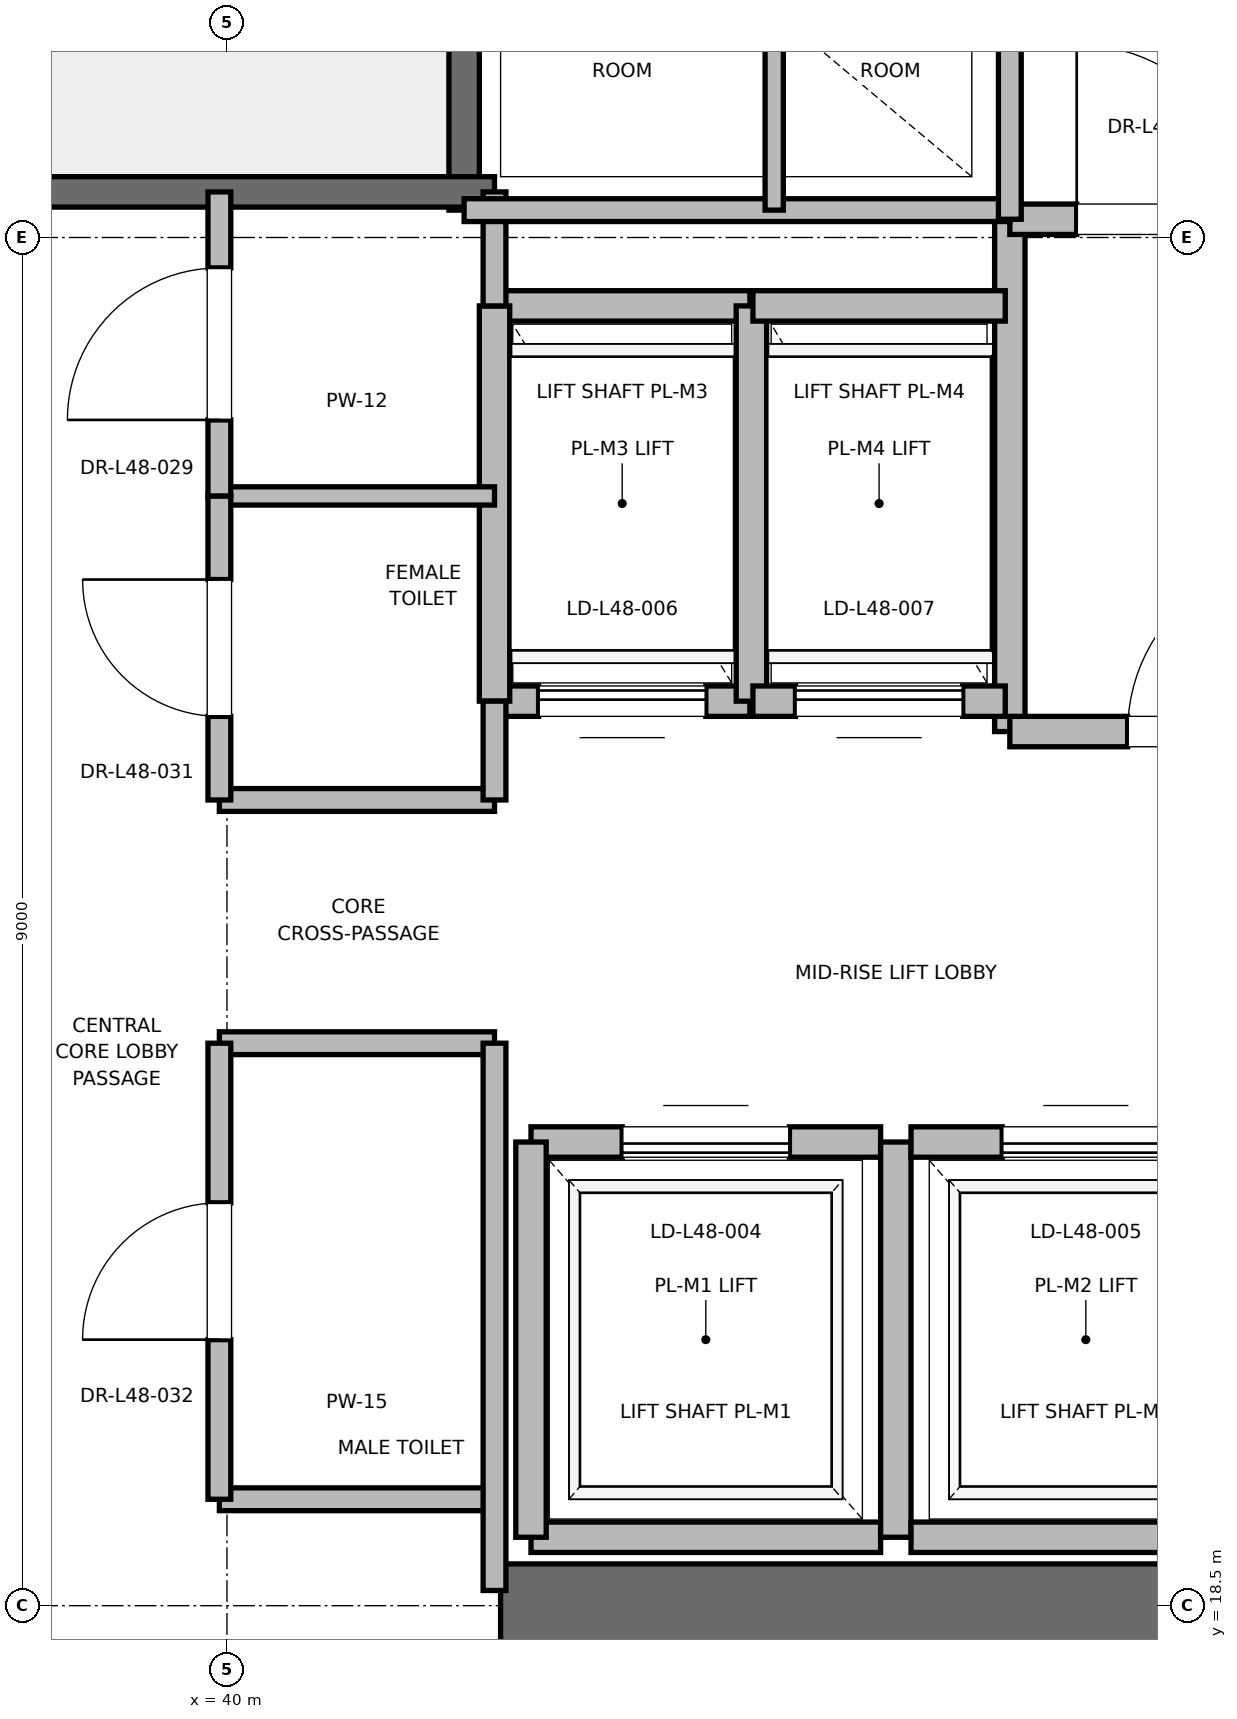
"""IFC4 building model, lengths in metres.
Left out: names, types, materials, properties, quantities, classifications, styles, units other than length and angle.
Written with IfcOpenShell. Run it as: python <this file> out.ifc"""

import sys

from ifc_helpers import new_model, si_unit, direction, frame, frame_2d, origin, place, context, subcontext, project, spatial, rectangle, extrude, element, fill, save


model = new_model("IFC4")
c1 = context("Model", 3, precision=1e-05, world=origin(), true_north=direction((0.0, 1.0)))
c2 = subcontext(c1, "Body", "Model", "MODEL_VIEW")
j1 = project(units=[si_unit("LENGTHUNIT", "METRE"), si_unit("PLANEANGLEUNIT", "RADIAN")], contexts=[c1])
p1 = place(None, origin())
s1 = spatial("IfcSite", under=j1, at=p1, CompositionType="ELEMENT")
p2 = place(p1, origin())
s2 = spatial("IfcBuilding", under=s1, at=p2, CompositionType="ELEMENT")
p3 = place(p2, frame((0.0, 0.0, 209.2)))
s3 = spatial("IfcBuildingStorey", under=s2, at=p3, CompositionType="ELEMENT", Elevation=209.2)
p4 = place(p3, frame((41.8, 18.5, 0.0), z_axis=(0.0, 0.0, 1.0), x_axis=(1.0, 0.0, 0.0)))
e1 = element("IfcWall", 1, at=p4, inside=s3, PredefinedType="SHEAR", context=c2, shape_type="SweptSolid", body=[
    extrude(rectangle(XDim=9.2, YDim=0.55, at=frame_2d((4.6, 0.0))), origin(), (0.0, 0.0, 1.0), 3.775),
])
p5 = place(p3, frame((41.56, 27.68, 0.0), z_axis=(0.0, 0.0, 1.0), x_axis=(0.0, 1.0, 0.0)))
e2 = element("IfcWall", 2, at=p5, inside=s3, PredefinedType="SOLIDWALL", context=c2, shape_type="SweptSolid", body=[
    extrude(rectangle(XDim=8.57, YDim=0.2, at=frame_2d((4.285, 0.0))), origin(), (0.0, 0.0, 1.0), 3.775),
])
p6 = place(p3, frame((38.44, 27.8, 0.0), z_axis=(0.0, 0.0, 1.0), x_axis=(1.0, 0.0, 0.0)))
e3 = element("IfcWall", 3, at=p6, inside=s3, PredefinedType="SOLIDWALL", context=c2, shape_type="SweptSolid", body=[
    extrude(rectangle(XDim=3.32, YDim=0.2, at=frame_2d((1.66, 0.0))), origin(), (0.0, 0.0, 1.0), 3.775),
])
p7 = place(p3, frame((45.15, 24.25, 0.0), z_axis=(0.0, 0.0, 1.0), x_axis=(0.0, 1.0, 0.0)))
e4 = element("IfcWall", 4, at=p7, inside=s3, PredefinedType="PARTITIONING", context=c2, shape_type="SweptSolid", body=[
    extrude(rectangle(XDim=3.37, YDim=0.2, at=frame_2d((1.685, 0.0))), origin(), (0.0, 0.0, 1.0), 3.775),
])
p8 = place(p3, frame((45.15, 24.25, 0.0), z_axis=(0.0, 0.0, 1.0), x_axis=(1.0, 0.0, 0.0)))
e5 = element("IfcWall", 5, at=p8, inside=s3, PredefinedType="PARTITIONING", context=c2, shape_type="SweptSolid", body=[
    extrude(rectangle(XDim=2.7, YDim=0.2, at=frame_2d((1.35, 0.0))), origin(), (0.0, 0.0, 1.0), 3.775),
])
p9 = place(p8, frame((0.775, 0.0, 0.0)))
e6 = element("IfcOpeningElement", 6, at=p9, cuts=e5, PredefinedType="OPENING", context=c2, shape_type="SweptSolid", body=[
    extrude(rectangle(XDim=1.15, YDim=2.2, at=frame_2d((0.575, 1.1))), frame((0.0, 0.1, 0.0), z_axis=(0.0, -1.0, 0.0), x_axis=(1.0, 0.0, 0.0)), (0.0, 0.0, 1.0), 0.2),
])
p10 = place(p3, frame((45.15, 27.62, 0.0), z_axis=(0.0, 0.0, 1.0), x_axis=(1.0, 0.0, 0.0)))
e7 = element("IfcWall", 7, at=p10, inside=s3, PredefinedType="PARTITIONING", context=c2, shape_type="SweptSolid", body=[
    extrude(rectangle(XDim=2.03, YDim=0.2, at=frame_2d((1.015, 0.0))), origin(), (0.0, 0.0, 1.0), 3.775),
])
p11 = place(p10, frame((0.44, 0.0, 0.0)))
e8 = element("IfcOpeningElement", 8, at=p11, cuts=e7, PredefinedType="OPENING", context=c2, shape_type="SweptSolid", body=[
    extrude(rectangle(XDim=1.15, YDim=2.2, at=frame_2d((0.575, 1.1))), frame((0.0, 0.1, 0.0), z_axis=(0.0, -1.0, 0.0), x_axis=(1.0, 0.0, 0.0)), (0.0, 0.0, 1.0), 0.2),
])
p12 = place(p3, frame((42.0, 18.95, 0.0), z_axis=(0.0, 0.0, 1.0), x_axis=(1.0, 0.0, 0.0)))
e9 = element("IfcWall", 9, at=p12, inside=s3, PredefinedType="SOLIDWALL", context=c2, shape_type="SweptSolid", body=[
    extrude(rectangle(XDim=2.3, YDim=0.2, at=frame_2d((1.15, 0.0))), origin(), (0.0, 0.0, 1.0), 2.755),
])
p13 = place(p3, frame((44.3, 21.55, 0.0), z_axis=(0.0, 0.0, 1.0), x_axis=(-1.0, 0.0, 0.0)))
e10 = element("IfcWall", 10, at=p13, inside=s3, PredefinedType="SOLIDWALL", context=c2, shape_type="SweptSolid", body=[
    extrude(rectangle(XDim=2.3, YDim=0.2, at=frame_2d((1.15, 0.0))), origin(), (0.0, 0.0, 1.0), 3.775),
])
p14 = place(p13, frame((0.6, 0.0, 0.0)))
e11 = element("IfcOpeningElement", 11, at=p14, cuts=e10, PredefinedType="OPENING", context=c2, shape_type="SweptSolid", body=[
    extrude(rectangle(XDim=1.1, YDim=2.2, at=frame_2d((0.55, 1.1))), frame((0.0, 0.1, 0.0), z_axis=(0.0, -1.0, 0.0), x_axis=(1.0, 0.0, 0.0)), (0.0, 0.0, 1.0), 0.2),
])
p15 = place(p3, frame((42.0, 21.55, 0.0), z_axis=(0.0, 0.0, 1.0), x_axis=(0.0, -1.0, 0.0)))
e12 = element("IfcWall", 12, at=p15, inside=s3, PredefinedType="SOLIDWALL", context=c2, shape_type="SweptSolid", body=[
    extrude(rectangle(XDim=2.6, YDim=0.2, at=frame_2d((1.3, 0.0))), origin(), (0.0, 0.0, 1.0), 2.755),
])
p16 = place(p3, frame((44.4, 18.95, 0.0), z_axis=(0.0, 0.0, 1.0), x_axis=(0.0, 1.0, 0.0)))
e13 = element("IfcWall", 13, at=p16, inside=s3, PredefinedType="SOLIDWALL", context=c2, shape_type="SweptSolid", body=[
    extrude(rectangle(XDim=2.6, YDim=0.2, at=frame_2d((1.3, 0.0))), origin(), (0.0, 0.0, 1.0), 3.775),
])
p17 = place(p3, frame((44.5, 18.95, 0.0), z_axis=(0.0, 0.0, 1.0), x_axis=(1.0, 0.0, 0.0)))
e14 = element("IfcWall", 14, at=p17, inside=s3, PredefinedType="SOLIDWALL", context=c2, shape_type="SweptSolid", body=[
    extrude(rectangle(XDim=2.3, YDim=0.2, at=frame_2d((1.15, 0.0))), origin(), (0.0, 0.0, 1.0), 3.775),
])
p18 = place(p3, frame((46.8, 21.55, 0.0), z_axis=(0.0, 0.0, 1.0), x_axis=(-1.0, 0.0, 0.0)))
e15 = element("IfcWall", 15, at=p18, inside=s3, PredefinedType="SOLIDWALL", context=c2, shape_type="SweptSolid", body=[
    extrude(rectangle(XDim=2.3, YDim=0.2, at=frame_2d((1.15, 0.0))), origin(), (0.0, 0.0, 1.0), 3.775),
])
p19 = place(p18, frame((0.6, 0.0, 0.0)))
e16 = element("IfcOpeningElement", 16, at=p19, cuts=e15, PredefinedType="OPENING", context=c2, shape_type="SweptSolid", body=[
    extrude(rectangle(XDim=1.1, YDim=2.2, at=frame_2d((0.55, 1.1))), frame((0.0, 0.1, 0.0), z_axis=(0.0, -1.0, 0.0), x_axis=(1.0, 0.0, 0.0)), (0.0, 0.0, 1.0), 0.2),
])
p20 = place(p3, frame((41.76, 24.45, 0.0), z_axis=(0.0, 0.0, 1.0), x_axis=(1.0, 0.0, 0.0)))
e17 = element("IfcWall", 17, at=p20, inside=s3, PredefinedType="SOLIDWALL", context=c2, shape_type="SweptSolid", body=[
    extrude(rectangle(XDim=1.68, YDim=0.2, at=frame_2d((0.84, 0.0))), origin(), (0.0, 0.0, 1.0), 3.775),
])
p21 = place(p20, frame((0.29, 0.0, 0.0)))
e18 = element("IfcOpeningElement", 18, at=p21, cuts=e17, PredefinedType="OPENING", context=c2, shape_type="SweptSolid", body=[
    extrude(rectangle(XDim=1.1, YDim=2.2, at=frame_2d((0.55, 1.1))), frame((0.0, 0.1, 0.0), z_axis=(0.0, -1.0, 0.0), x_axis=(1.0, 0.0, 0.0)), (0.0, 0.0, 1.0), 0.2),
])
p22 = place(p3, frame((43.44, 27.05, 0.0), z_axis=(0.0, 0.0, 1.0), x_axis=(-1.0, 0.0, 0.0)))
e19 = element("IfcWall", 19, at=p22, inside=s3, PredefinedType="SOLIDWALL", context=c2, shape_type="SweptSolid", body=[
    extrude(rectangle(XDim=1.68, YDim=0.2, at=frame_2d((0.84, 0.0))), origin(), (0.0, 0.0, 1.0), 3.775),
])
for number, where, z_axis, x_axis in (
    (20, (41.76, 27.05, 0.0), (0.0, 0.0, 1.0), (0.0, -1.0, 0.0)),
    (21, (43.45, 24.45, 0.0), (0.0, 0.0, 1.0), (0.0, 1.0, 0.0)),
):
    element("IfcWall", number, at=place(p3, frame(where, z_axis=z_axis, x_axis=x_axis)), inside=s3, PredefinedType="SOLIDWALL", context=c2, shape_type="SweptSolid", body=[
        extrude(rectangle(XDim=2.6, YDim=0.2, at=frame_2d((1.3, 0.0))), origin(), (0.0, 0.0, 1.0), 3.775),
    ])
p23 = place(p3, frame((43.46, 24.45, 0.0), z_axis=(0.0, 0.0, 1.0), x_axis=(1.0, 0.0, 0.0)))
e22 = element("IfcWall", 22, at=p23, inside=s3, PredefinedType="SOLIDWALL", context=c2, shape_type="SweptSolid", body=[
    extrude(rectangle(XDim=1.66, YDim=0.2, at=frame_2d((0.83, 0.0))), origin(), (0.0, 0.0, 1.0), 3.775),
])
p24 = place(p23, frame((0.28, 0.0, 0.0)))
e23 = element("IfcOpeningElement", 23, at=p24, cuts=e22, PredefinedType="OPENING", context=c2, shape_type="SweptSolid", body=[
    extrude(rectangle(XDim=1.1, YDim=2.2, at=frame_2d((0.55, 1.1))), frame((0.0, 0.1, 0.0), z_axis=(0.0, -1.0, 0.0), x_axis=(1.0, 0.0, 0.0)), (0.0, 0.0, 1.0), 0.2),
])
p25 = place(p3, frame((45.12, 27.05, 0.0), z_axis=(0.0, 0.0, 1.0), x_axis=(-1.0, 0.0, 0.0)))
e24 = element("IfcWall", 24, at=p25, inside=s3, PredefinedType="SOLIDWALL", context=c2, shape_type="SweptSolid", body=[
    extrude(rectangle(XDim=1.66, YDim=0.2, at=frame_2d((0.83, 0.0))), origin(), (0.0, 0.0, 1.0), 3.775),
])
for number, where, z_axis, x_axis in (
    (25, (39.95, 19.2, 0.0), (0.0, 0.0, 1.0), (1.0, 0.0, 0.0)),
    (26, (39.95, 22.2, 0.0), (0.0, 0.0, 1.0), (1.0, 0.0, 0.0)),
    (27, (39.95, 23.8, 0.0), (0.0, 0.0, 1.0), (1.0, 0.0, 0.0)),
):
    element("IfcWall", number, at=place(p3, frame(where, z_axis=z_axis, x_axis=x_axis)), inside=s3, PredefinedType="PARTITIONING", context=c2, shape_type="SweptSolid", body=[
        extrude(rectangle(XDim=1.81, YDim=0.15, at=frame_2d((0.905, 0.0))), origin(), (0.0, 0.0, 1.0), 2.85),
    ])
p26 = place(p3, frame((39.95, 25.8, 0.0), z_axis=(0.0, 0.0, 1.0), x_axis=(1.0, 0.0, 0.0)))
e28 = element("IfcWall", 28, at=p26, inside=s3, PredefinedType="PARTITIONING", context=c2, shape_type="SweptSolid", body=[
    extrude(rectangle(XDim=1.81, YDim=0.12, at=frame_2d((0.905, 0.0))), origin(), (0.0, 0.0, 1.0), 2.85),
])
p27 = place(p3, frame((41.76, 18.6, 0.0), z_axis=(0.0, 0.0, 1.0), x_axis=(0.0, 1.0, 0.0)))
e29 = element("IfcWall", 29, at=p27, inside=s3, PredefinedType="PARTITIONING", context=c2, shape_type="SweptSolid", body=[
    extrude(rectangle(XDim=3.6, YDim=0.15, at=frame_2d((1.8, 0.0))), origin(), (0.0, 0.0, 1.0), 2.755),
])
p28 = place(p3, frame((41.76, 23.8, 0.0), z_axis=(0.0, 0.0, 1.0), x_axis=(0.0, 1.0, 0.0)))
e30 = element("IfcWall", 30, at=p28, inside=s3, PredefinedType="PARTITIONING", context=c2, shape_type="SweptSolid", body=[
    extrude(rectangle(XDim=0.65, YDim=0.15, at=frame_2d((0.325, 0.0))), origin(), (0.0, 0.0, 1.0), 2.85),
])
p29 = place(p3, frame((41.76, 27.05, 0.0), z_axis=(0.0, 0.0, 1.0), x_axis=(0.0, 1.0, 0.0)))
e31 = element("IfcWall", 31, at=p29, inside=s3, PredefinedType="PARTITIONING", context=c2, shape_type="SweptSolid", body=[
    extrude(rectangle(XDim=0.75, YDim=0.15, at=frame_2d((0.375, 0.0))), origin(), (0.0, 0.0, 1.0), 2.85),
])
p30 = place(p3, frame((39.95, 19.2, 0.0), z_axis=(0.0, 0.0, 1.0), x_axis=(0.0, 1.0, 0.0)))
e32 = element("IfcWall", 32, at=p30, inside=s3, PredefinedType="PARTITIONING", context=c2, shape_type="SweptSolid", body=[
    extrude(rectangle(XDim=3.0, YDim=0.15, at=frame_2d((1.5, 0.0))), origin(), (0.0, 0.0, 1.0), 2.85),
])
p31 = place(p30, frame((1.05, 0.0, 0.0)))
e33 = element("IfcOpeningElement", 33, at=p31, cuts=e32, PredefinedType="OPENING", context=c2, shape_type="SweptSolid", body=[
    extrude(rectangle(XDim=0.9, YDim=2.1, at=frame_2d((0.45, 1.05))), frame((0.0, 0.075, 0.0), z_axis=(0.0, -1.0, 0.0), x_axis=(1.0, 0.0, 0.0)), (0.0, 0.0, 1.0), 0.15),
])
p32 = place(p3, frame((39.95, 23.8, 0.0), z_axis=(0.0, 0.0, 1.0), x_axis=(0.0, 1.0, 0.0)))
e34 = element("IfcWall", 34, at=p32, inside=s3, PredefinedType="PARTITIONING", context=c2, shape_type="SweptSolid", body=[
    extrude(rectangle(XDim=2.0, YDim=0.15, at=frame_2d((1.0, 0.0))), origin(), (0.0, 0.0, 1.0), 2.85),
])
p33 = place(p32, frame((0.55, 0.0, 0.0)))
e35 = element("IfcOpeningElement", 35, at=p33, cuts=e34, PredefinedType="OPENING", context=c2, shape_type="SweptSolid", body=[
    extrude(rectangle(XDim=0.9, YDim=2.1, at=frame_2d((0.45, 1.05))), frame((0.0, 0.075, 0.0), z_axis=(0.0, -1.0, 0.0), x_axis=(1.0, 0.0, 0.0)), (0.0, 0.0, 1.0), 0.15),
])
p34 = place(p3, frame((39.95, 25.8, 0.0), z_axis=(0.0, 0.0, 1.0), x_axis=(0.0, 1.0, 0.0)))
e36 = element("IfcWall", 36, at=p34, inside=s3, PredefinedType="PARTITIONING", context=c2, shape_type="SweptSolid", body=[
    extrude(rectangle(XDim=2.0, YDim=0.15, at=frame_2d((1.0, 0.0))), origin(), (0.0, 0.0, 1.0), 2.85),
])
p35 = place(p34, frame((0.5, 0.0, 0.0)))
e37 = element("IfcOpeningElement", 37, at=p35, cuts=e36, PredefinedType="OPENING", context=c2, shape_type="SweptSolid", body=[
    extrude(rectangle(XDim=1.0, YDim=2.15, at=frame_2d((0.5, 1.075))), frame((0.0, 0.075, 0.0), z_axis=(0.0, -1.0, 0.0), x_axis=(1.0, 0.0, 0.0)), (0.0, 0.0, 1.0), 0.15),
])
p36 = place(p3, frame((41.56, 27.68, 0.0), z_axis=(0.0, 0.0, 1.0), x_axis=(1.0, 0.0, 0.0)))
e38 = element("IfcWall", 38, at=p36, inside=s3, PredefinedType="PARTITIONING", context=c2, shape_type="SweptSolid", body=[
    extrude(rectangle(XDim=3.59, YDim=0.15, at=frame_2d((1.795, 0.0))), origin(), (0.0, 0.0, 1.0), 2.85),
])
p37 = place(p3, frame((45.15, 27.62, 0.0), z_axis=(0.0, 0.0, 1.0), x_axis=(0.0, 1.0, 0.0)))
e39 = element("IfcWall", 39, at=p37, inside=s3, PredefinedType="PARTITIONING", context=c2, shape_type="SweptSolid", body=[
    extrude(rectangle(XDim=3.1, YDim=0.15, at=frame_2d((1.55, 0.0))), origin(), (0.0, 0.0, 1.0), 2.85),
])
p38 = place(p3, frame((43.6, 27.68, 0.0), z_axis=(0.0, 0.0, 1.0), x_axis=(0.0, 1.0, 0.0)))
e40 = element("IfcWall", 40, at=p38, inside=s3, PredefinedType="PARTITIONING", context=c2, shape_type="SweptSolid", body=[
    extrude(rectangle(XDim=3.04, YDim=0.12, at=frame_2d((1.52, 0.0))), origin(), (0.0, 0.0, 1.0), 2.85),
])
p39 = place(p9, origin())
e41 = element("IfcDoor", 41, at=p39, inside=s3, OperationType="SINGLE_SWING_RIGHT", PredefinedType="DOOR", context=c2, shape_type="SweptSolid", body=[
    extrude(rectangle(XDim=1.15, YDim=2.2, at=frame_2d((0.575, 1.1))), frame((0.0, 0.025, 0.0), z_axis=(0.0, -1.0, 0.0), x_axis=(1.0, 0.0, 0.0)), (0.0, 0.0, 1.0), 0.05),
])
fill(e6, e41)
p40 = place(p11, origin())
e42 = element("IfcDoor", 42, at=p40, inside=s3, OperationType="SINGLE_SWING_LEFT", PredefinedType="DOOR", context=c2, shape_type="SweptSolid", body=[
    extrude(rectangle(XDim=1.15, YDim=2.2, at=frame_2d((0.575, 1.1))), frame((0.0, 0.025, 0.0), z_axis=(0.0, -1.0, 0.0), x_axis=(1.0, 0.0, 0.0)), (0.0, 0.0, 1.0), 0.05),
])
fill(e8, e42)
p41 = place(p14, origin())
e43 = element("IfcDoor", 43, at=p41, inside=s3, OperationType="SLIDING_TO_RIGHT", PredefinedType="DOOR", context=c2, shape_type="SweptSolid", body=[
    extrude(rectangle(XDim=1.1, YDim=2.2, at=frame_2d((0.55, 1.1))), frame((0.0, 0.025, 0.0), z_axis=(0.0, -1.0, 0.0), x_axis=(1.0, 0.0, 0.0)), (0.0, 0.0, 1.0), 0.05),
])
fill(e11, e43)
p42 = place(p19, origin())
e44 = element("IfcDoor", 44, at=p42, inside=s3, OperationType="SLIDING_TO_RIGHT", PredefinedType="DOOR", context=c2, shape_type="SweptSolid", body=[
    extrude(rectangle(XDim=1.1, YDim=2.2, at=frame_2d((0.55, 1.1))), frame((0.0, 0.025, 0.0), z_axis=(0.0, -1.0, 0.0), x_axis=(1.0, 0.0, 0.0)), (0.0, 0.0, 1.0), 0.05),
])
fill(e16, e44)
p43 = place(p21, origin())
e45 = element("IfcDoor", 45, at=p43, inside=s3, OperationType="SLIDING_TO_RIGHT", PredefinedType="DOOR", context=c2, shape_type="SweptSolid", body=[
    extrude(rectangle(XDim=1.1, YDim=2.2, at=frame_2d((0.55, 1.1))), frame((0.0, 0.025, 0.0), z_axis=(0.0, -1.0, 0.0), x_axis=(1.0, 0.0, 0.0)), (0.0, 0.0, 1.0), 0.05),
])
fill(e18, e45)
p44 = place(p24, origin())
e46 = element("IfcDoor", 46, at=p44, inside=s3, OperationType="SLIDING_TO_RIGHT", PredefinedType="DOOR", context=c2, shape_type="SweptSolid", body=[
    extrude(rectangle(XDim=1.1, YDim=2.2, at=frame_2d((0.55, 1.1))), frame((0.0, 0.025, 0.0), z_axis=(0.0, -1.0, 0.0), x_axis=(1.0, 0.0, 0.0)), (0.0, 0.0, 1.0), 0.05),
])
fill(e23, e46)
p45 = place(p31, origin())
e47 = element("IfcDoor", 47, at=p45, inside=s3, OperationType="SINGLE_SWING_LEFT", PredefinedType="DOOR", context=c2, shape_type="SweptSolid", body=[
    extrude(rectangle(XDim=0.9, YDim=2.1, at=frame_2d((0.45, 1.05))), frame((0.0, 0.025, 0.0), z_axis=(0.0, -1.0, 0.0), x_axis=(1.0, 0.0, 0.0)), (0.0, 0.0, 1.0), 0.05),
])
fill(e33, e47)
p46 = place(p33, origin())
e48 = element("IfcDoor", 48, at=p46, inside=s3, OperationType="SINGLE_SWING_RIGHT", PredefinedType="DOOR", context=c2, shape_type="SweptSolid", body=[
    extrude(rectangle(XDim=0.9, YDim=2.1, at=frame_2d((0.45, 1.05))), frame((0.0, 0.025, 0.0), z_axis=(0.0, -1.0, 0.0), x_axis=(1.0, 0.0, 0.0)), (0.0, 0.0, 1.0), 0.05),
])
fill(e35, e48)
p47 = place(p35, origin())
e49 = element("IfcDoor", 49, at=p47, inside=s3, OperationType="SINGLE_SWING_LEFT", PredefinedType="DOOR", context=c2, shape_type="SweptSolid", body=[
    extrude(rectangle(XDim=1.0, YDim=2.15, at=frame_2d((0.5, 1.075))), frame((0.0, 0.025, 0.0), z_axis=(0.0, -1.0, 0.0), x_axis=(1.0, 0.0, 0.0)), (0.0, 0.0, 1.0), 0.05),
])
fill(e37, e49)
save(model, sys.argv[1])
